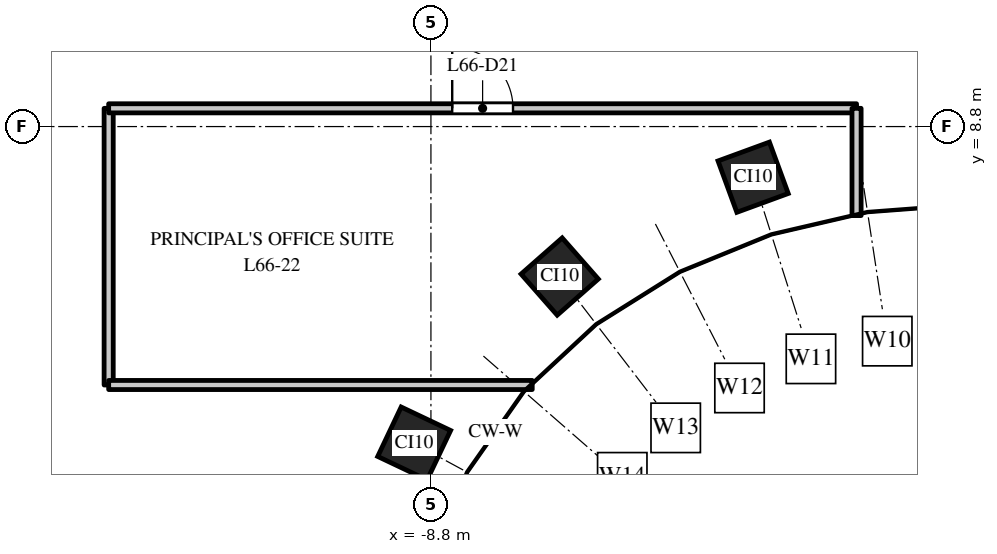
"""IFC4 building model, lengths in metres.
Left out: names, types, materials, properties, quantities, classifications, styles, units other than length and angle.
Written with IfcOpenShell. Run it as: python <this file> out.ifc"""

import sys

from ifc_helpers import new_model, si_unit, direction, frame, frame_2d, origin, origin_2d, place, context, subcontext, project, spatial, rectangle, extrude, element, fill, save


model = new_model("IFC4")
c1 = context("Model", 3, precision=1e-05, world=origin(), true_north=direction((0.0, 1.0)))
c2 = subcontext(c1, "Body", "Model", "MODEL_VIEW")
j1 = project(units=[si_unit("LENGTHUNIT", "METRE"), si_unit("PLANEANGLEUNIT", "RADIAN")], contexts=[c1])
p1 = place(None, origin())
s1 = spatial("IfcSite", under=j1, at=p1, CompositionType="ELEMENT")
p2 = place(p1, origin())
s2 = spatial("IfcBuilding", under=s1, at=p2, CompositionType="ELEMENT")
p3 = place(p2, frame((0.0, 0.0, 307.0)))
s3 = spatial("IfcBuildingStorey", under=s2, at=p3, CompositionType="ELEMENT", Elevation=307.0)
for number, where, z_axis, x_axis in (
    (1, (-3.501, 7.967, 0.0), (0.0, 0.0, 1.0), (-0.939, -0.344, 0.0)),
    (2, (-6.682, 6.334, 0.0), (0.0, 0.0, 1.0), (-0.751, -0.66, 0.0)),
    (3, (-9.076, 3.588, 0.0), (0.0, 0.0, 1.0), (-0.429, -0.903, 0.0)),
):
    element("IfcColumn", number, at=place(p3, frame(where, z_axis=z_axis, x_axis=x_axis)), inside=s3, PredefinedType="COLUMN", context=c2, shape_type="SweptSolid", body=[
        extrude(rectangle(XDim=0.9, YDim=0.9, at=origin_2d()), origin(), (0.0, 0.0, 1.0), 4.0),
    ])
p4 = place(p3, frame((-14.1, 4.55, 0.0), z_axis=(0.0, 0.0, 1.0), x_axis=(0.0, 1.0, 0.0)))
e4 = element("IfcWall", 4, at=p4, inside=s3, PredefinedType="PARTITIONING", context=c2, shape_type="SweptSolid", body=[
    extrude(rectangle(XDim=4.55, YDim=0.15, at=frame_2d((2.275, 0.0))), origin(), (0.0, 0.0, 1.0), 3.7),
])
p5 = place(p3, frame((-14.1, 4.55, 0.0), z_axis=(0.0, 0.0, 1.0), x_axis=(1.0, 0.0, 0.0)))
e5 = element("IfcWall", 5, at=p5, inside=s3, PredefinedType="PARTITIONING", context=c2, shape_type="SweptSolid", body=[
    extrude(rectangle(XDim=6.966, YDim=0.15, at=frame_2d((3.483, 0.0))), origin(), (0.0, 0.0, 1.0), 3.0),
])
p6 = place(p3, frame((-14.1, 9.1, 0.0), z_axis=(0.0, 0.0, 1.0), x_axis=(1.0, 0.0, 0.0)))
e6 = element("IfcWall", 6, at=p6, inside=s3, PredefinedType="PARTITIONING", context=c2, shape_type="SweptSolid", body=[
    extrude(rectangle(XDim=12.3, YDim=0.15, at=frame_2d((6.15, 0.0))), origin(), (0.0, 0.0, 1.0), 2.75),
])
p7 = place(p6, frame((5.65, 0.0, 0.0)))
e7 = element("IfcOpeningElement", 7, at=p7, cuts=e6, PredefinedType="OPENING", context=c2, shape_type="SweptSolid", body=[
    extrude(rectangle(XDim=1.0, YDim=2.1, at=frame_2d((0.5, 1.05))), frame((0.0, 0.085, 0.0), z_axis=(0.0, -1.0, 0.0), x_axis=(1.0, 0.0, 0.0)), (0.0, 0.0, 1.0), 0.17),
])
p8 = place(p3, frame((-1.8, 7.336, 0.0), z_axis=(0.0, 0.0, 1.0), x_axis=(0.0, 1.0, 0.0)))
e8 = element("IfcWall", 8, at=p8, inside=s3, PredefinedType="PARTITIONING", context=c2, shape_type="SweptSolid", body=[
    extrude(rectangle(XDim=1.764, YDim=0.15, at=frame_2d((0.882, 0.0))), origin(), (0.0, 0.0, 1.0), 3.0),
])
p9 = place(p7, origin())
e9 = element("IfcDoor", 9, at=p9, inside=s3, OperationType="SINGLE_SWING_LEFT", PredefinedType="DOOR", context=c2, shape_type="SweptSolid", body=[
    extrude(rectangle(XDim=1.0, YDim=2.1, at=frame_2d((0.5, 1.05))), frame((0.0, 0.025, 0.0), z_axis=(0.0, -1.0, 0.0), x_axis=(1.0, 0.0, 0.0)), (0.0, 0.0, 1.0), 0.05),
])
fill(e7, e9)
save(model, sys.argv[1])
